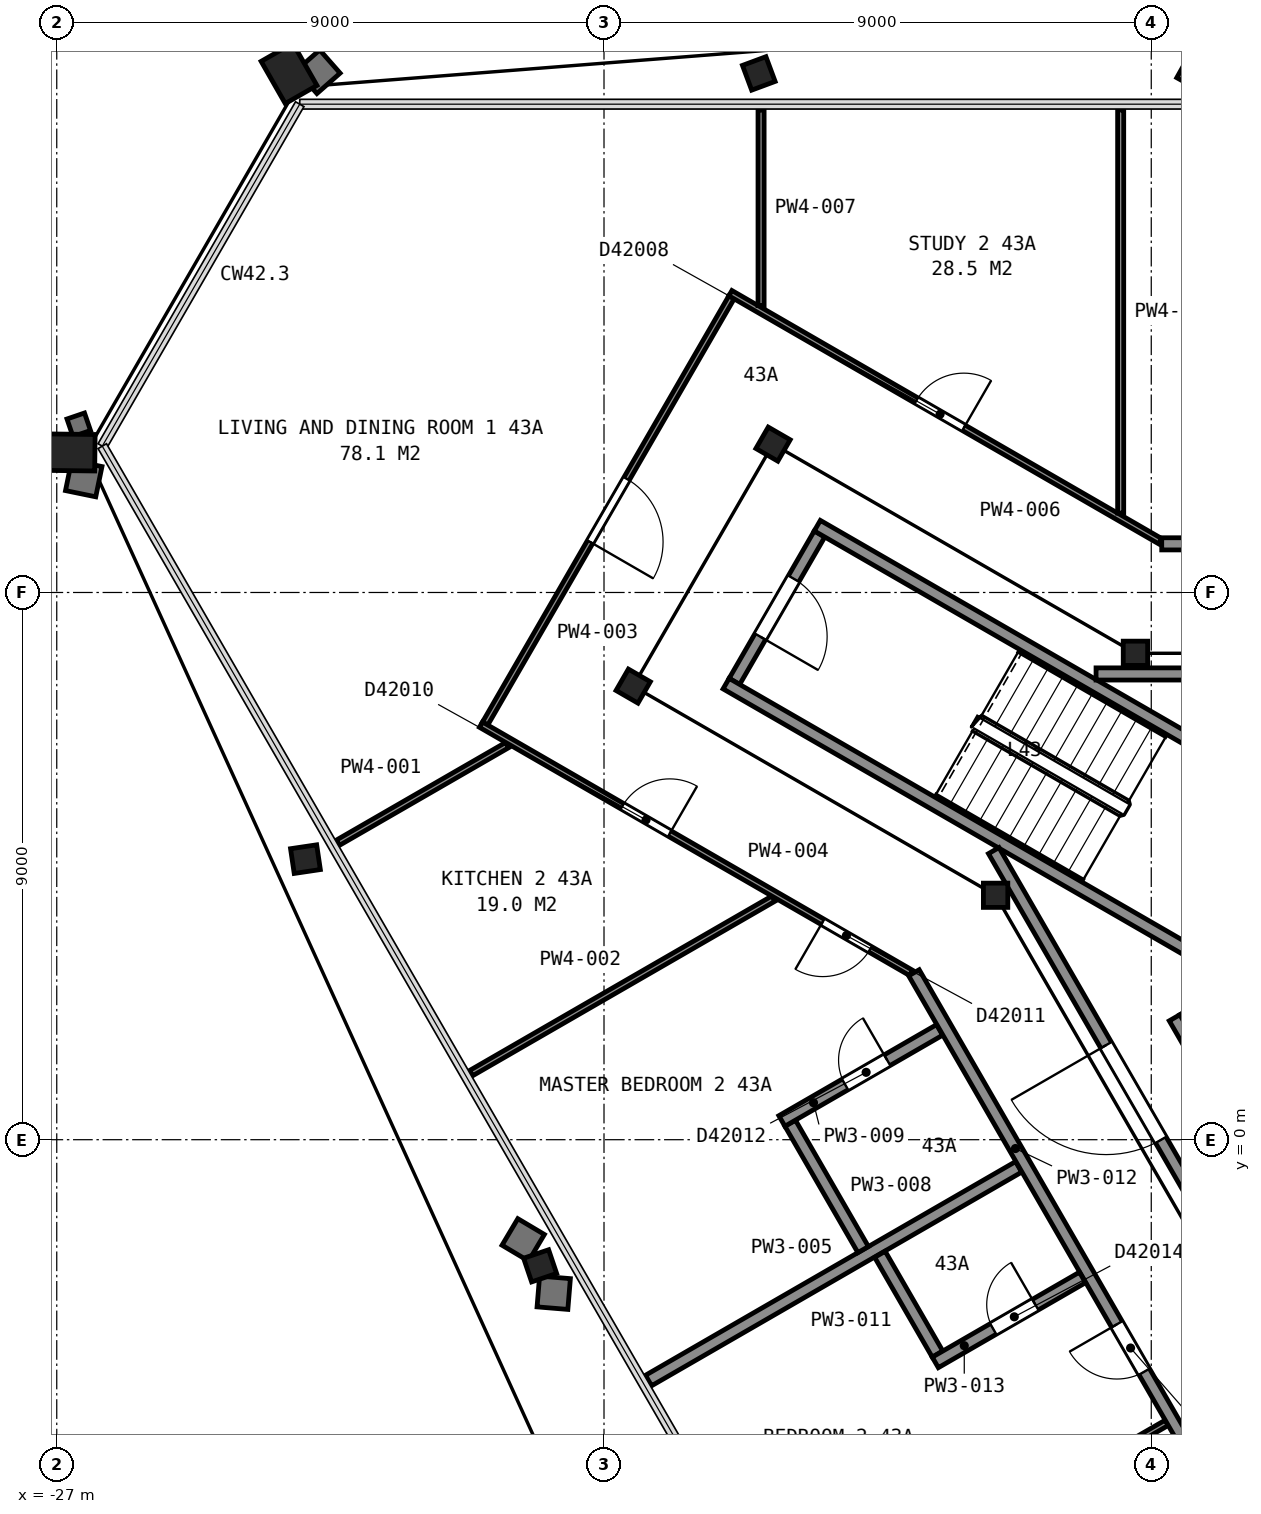
"""IFC4 building model, lengths in metres.
Left out: names, types, materials, properties, quantities, classifications, styles, units other than length and angle.
Written with IfcOpenShell. Run it as: python <this file> out.ifc"""

import sys

from ifc_helpers import new_model, si_unit, direction, frame, frame_2d, origin, origin_2d, place, context, subcontext, project, spatial, rectangle, hollow_rectangle, i_section, extrude, element, fill, save


model = new_model("IFC4")
c1 = context("Model", 3, precision=1e-05, world=origin(), true_north=direction((0.0, 1.0)))
c2 = subcontext(c1, "Body", "Model", "MODEL_VIEW")
j1 = project(units=[si_unit("LENGTHUNIT", "METRE"), si_unit("PLANEANGLEUNIT", "RADIAN")], contexts=[c1])
p1 = place(None, origin())
s1 = spatial("IfcSite", under=j1, at=p1, CompositionType="ELEMENT")
p2 = place(p1, origin())
s2 = spatial("IfcBuilding", under=s1, at=p2, CompositionType="ELEMENT")
p3 = place(p2, frame((0.0, 0.0, 174.7)))
s3 = spatial("IfcBuildingStorey", under=s2, at=p3, CompositionType="ELEMENT", Elevation=174.7)
p4 = place(p3, frame((-15.373, 17.318, 0.04), z_axis=(-0.06888386825, 0.185431142459, 0.980239921704), x_axis=(0.997540564772, 4.290776e-05, 0.070091510131)))
e1 = element("IfcColumn", 1, at=p4, inside=s3, PredefinedType="COLUMN", context=c2, shape_type="SweptSolid", body=[
    extrude(i_section(OverallWidth=0.411, OverallDepth=0.434, WebThickness=0.036, FlangeThickness=0.057, FilletRadius=0.015, at=origin_2d()), origin(), (0.0, 0.0, 1.0), 3.693),
])
p5 = place(p3, frame((-23.057, 17.322, 0.065), z_axis=(-0.105703911209, 0.184881619668, 0.977059604049), x_axis=(0.496815418669, 0.860963064013, -0.109165205894)))
e2 = element("IfcColumn", 2, at=p5, inside=s3, PredefinedType="COLUMN", context=c2, shape_type="SweptSolid", body=[
    extrude(hollow_rectangle(XDim=0.6, YDim=0.8, WallThickness=0.05, at=origin_2d()), origin(), (0.0, 0.0, 1.0), 3.654),
])
p6 = place(p3, frame((-26.524, 11.3, 0.065), z_axis=(-0.213901349947, 0.002605294393, 0.976851792716), x_axis=(0.49700817695, 0.861181491994, 0.106533139876)))
e3 = element("IfcColumn", 3, at=p6, inside=s3, PredefinedType="COLUMN", context=c2, shape_type="SweptSolid", body=[
    extrude(hollow_rectangle(XDim=0.6, YDim=0.8, WallThickness=0.05, at=origin_2d()), origin(), (0.0, 0.0, 1.0), 3.655),
])
p7 = place(p3, frame((-22.678, 4.649, 0.04), z_axis=(-0.196058591041, -0.029084888759, 0.980160751165), x_axis=(-0.498371232054, 0.863795030642, -0.07405579045)))
e4 = element("IfcColumn", 4, at=p7, inside=s3, PredefinedType="COLUMN", context=c2, shape_type="SweptSolid", body=[
    extrude(i_section(OverallWidth=0.411, OverallDepth=0.434, WebThickness=0.036, FlangeThickness=0.057, FilletRadius=0.015, at=origin_2d()), origin(), (0.0, 0.0, 1.0), 3.693),
])
p8 = place(p3, frame((-18.836, -2.002, 0.035), z_axis=(-0.180451873163, -0.061008975778, 0.981689882981), x_axis=(-0.499524497099, 0.86546437235, -0.038035470172)))
e5 = element("IfcColumn", 5, at=p8, inside=s3, PredefinedType="COLUMN", context=c2, shape_type="SweptSolid", body=[
    extrude(i_section(OverallWidth=0.411, OverallDepth=0.434, WebThickness=0.036, FlangeThickness=0.057, FilletRadius=0.015, at=origin_2d()), origin(), (0.0, 0.0, 1.0), 3.698),
])
p9 = place(p3, frame((-9.26, 8.0, 0.0), z_axis=(0.0, 0.0, 1.0), x_axis=(1.0, 0.0, 0.0)))
e6 = element("IfcColumn", 6, at=p9, inside=s3, PredefinedType="COLUMN", context=c2, shape_type="SweptSolid", body=[
    extrude(i_section(OverallWidth=0.401, OverallDepth=0.399, WebThickness=0.025, FlangeThickness=0.04, FilletRadius=0.015, at=origin_2d()), origin(), (0.0, 0.0, 1.0), 3.7),
])
for number, where, z_axis, x_axis in (
    (7, (-15.22, 11.44, 0.0), (0.0, 0.0, 1.0), (0.5, 0.866, 0.0)),
    (8, (-17.52, 7.46, 0.0), (0.0, 0.0, 1.0), (0.5, 0.866, 0.0)),
):
    element("IfcColumn", number, at=place(p3, frame(where, z_axis=z_axis, x_axis=x_axis)), inside=s3, PredefinedType="COLUMN", context=c2, shape_type="SweptSolid", body=[
        extrude(i_section(OverallWidth=0.406, OverallDepth=0.417, WebThickness=0.03, FlangeThickness=0.048, FilletRadius=0.015, at=origin_2d()), origin(), (0.0, 0.0, 1.0), 3.7),
    ])
p10 = place(p3, frame((-11.56, 4.02, 0.0), z_axis=(0.0, 0.0, 1.0), x_axis=(1.0, 0.0, 0.0)))
e9 = element("IfcColumn", 9, at=p10, inside=s3, PredefinedType="COLUMN", context=c2, shape_type="SweptSolid", body=[
    extrude(i_section(OverallWidth=0.401, OverallDepth=0.399, WebThickness=0.025, FlangeThickness=0.04, FilletRadius=0.015, at=origin_2d()), origin(), (0.0, 0.0, 1.0), 3.7),
])
p11 = place(p3, frame((-14.455, 9.962, 0.0), z_axis=(0.0, 0.0, 1.0), x_axis=(-0.500049511043, -0.865996816683, 0.0)))
e10 = element("IfcWall", 10, at=p11, inside=s3, PredefinedType="PARTITIONING", context=c2, shape_type="SweptSolid", body=[
    extrude(rectangle(XDim=2.8, YDim=0.2, at=frame_2d((1.4, 0.0))), origin(), (0.0, 0.0, 1.0), 3.45),
])
p12 = place(p11, frame((0.85, 0.0, 0.0)))
e11 = element("IfcOpeningElement", 11, at=p12, cuts=e10, PredefinedType="OPENING", context=c2, shape_type="SweptSolid", body=[
    extrude(rectangle(XDim=1.1, YDim=2.1, at=frame_2d((0.55, 1.05))), frame((0.0, 0.11, 0.0), z_axis=(0.0, -1.0, 0.0), x_axis=(1.0, 0.0, 0.0)), (0.0, 0.0, 1.0), 0.22),
])
for number, where, z_axis, x_axis in (
    (12, (-7.678, 2.701, 0.0), (0.0, 0.0, 1.0), (-0.866, 0.5, 0.0)),
    (13, (-6.178, 5.299, 0.0), (0.0, 0.0, 1.0), (-0.866, 0.5, 0.0)),
):
    element("IfcWall", number, at=place(p3, frame(where, z_axis=z_axis, x_axis=x_axis)), inside=s3, PredefinedType="PARTITIONING", context=c2, shape_type="SweptSolid", body=[
        extrude(rectangle(XDim=9.6, YDim=0.2, at=frame_2d((4.8, 0.0))), origin(), (0.0, 0.0, 1.0), 3.45),
    ])
p13 = place(p3, frame((-8.48, 1.969, 0.0), z_axis=(0.0, 0.0, 1.0), x_axis=(0.866000020948, 0.500043961785, 0.0)))
e14 = element("IfcWall", 14, at=p13, inside=s3, PredefinedType="PARTITIONING", context=c2, shape_type="SweptSolid", body=[
    extrude(rectangle(XDim=1.95, YDim=0.2, at=frame_2d((0.975, 0.0))), origin(), (0.0, 0.0, 1.0), 3.7),
])
p14 = place(p3, frame((-7.242, -0.376, 0.0), z_axis=(0.0, 0.0, 1.0), x_axis=(-0.499996545922, 0.866027397988, 0.0)))
e15 = element("IfcWall", 15, at=p14, inside=s3, PredefinedType="PARTITIONING", context=c2, shape_type="SweptSolid", body=[
    extrude(rectangle(XDim=2.75, YDim=0.2, at=frame_2d((1.375, 0.0))), origin(), (0.0, 0.0, 1.0), 3.7),
])
p15 = place(p3, frame((-11.591, 4.755, 0.0), z_axis=(0.0, 0.0, 1.0), x_axis=(0.500043977787, -0.866000011708, 0.0)))
e16 = element("IfcWall", 16, at=p15, inside=s3, PredefinedType="PARTITIONING", context=c2, shape_type="SweptSolid", body=[
    extrude(rectangle(XDim=6.617, YDim=0.2, at=frame_2d((3.308, 0.0))), origin(), (0.0, 0.0, 1.0), 3.45),
])
p16 = place(p15, frame((3.695, 0.0, 0.0)))
e17 = element("IfcOpeningElement", 17, at=p16, cuts=e16, PredefinedType="OPENING", context=c2, shape_type="SweptSolid", body=[
    extrude(rectangle(XDim=1.8, YDim=2.1, at=frame_2d((0.9, 1.05))), frame((0.0, 0.11, 0.0), z_axis=(0.0, -1.0, 0.0), x_axis=(1.0, 0.0, 0.0)), (0.0, 0.0, 1.0), 0.22),
])
p17 = place(p3, frame((-9.908, 7.66, 0.0), z_axis=(0.0, 0.0, 1.0), x_axis=(1.0, 0.0, 0.0)))
e18 = element("IfcWall", 18, at=p17, inside=s3, PredefinedType="PARTITIONING", context=c2, shape_type="SweptSolid", body=[
    extrude(rectangle(XDim=3.621, YDim=0.2, at=frame_2d((1.811, 0.0))), origin(), (0.0, 0.0, 1.0), 3.45),
])
p18 = place(p3, frame((-22.375, 4.885, 0.0), z_axis=(0.0, 0.0, 1.0), x_axis=(0.866164079783, 0.499759729163, 0.0)))
e19 = element("IfcWall", 19, at=p18, inside=s3, PredefinedType="PARTITIONING", context=c2, shape_type="SweptSolid", body=[
    extrude(rectangle(XDim=3.213, YDim=0.1, at=frame_2d((1.606, 0.0))), origin(), (0.0, 0.0, 1.0), 2.713),
])
p19 = place(p3, frame((-20.187, 1.094, 0.0), z_axis=(0.0, 0.0, 1.0), x_axis=(0.866060256018, 0.499939629302, 0.0)))
e20 = element("IfcWall", 20, at=p19, inside=s3, PredefinedType="PARTITIONING", context=c2, shape_type="SweptSolid", body=[
    extrude(rectangle(XDim=5.741, YDim=0.1, at=frame_2d((2.871, 0.0))), origin(), (0.0, 0.0, 1.0), 2.713),
])
p20 = place(p3, frame((-19.955, 6.844, 0.0), z_axis=(0.0, 0.0, 1.0), x_axis=(0.500415732313, 0.865785247537, 0.0)))
e21 = element("IfcWall", 21, at=p20, inside=s3, PredefinedType="PARTITIONING", context=c2, shape_type="SweptSolid", body=[
    extrude(rectangle(XDim=8.097, YDim=0.1, at=frame_2d((4.049, 0.0))), origin(), (0.0, 0.0, 1.0), 2.713),
])
p21 = place(p20, frame((3.45, 0.0, 0.0)))
e22 = element("IfcOpeningElement", 22, at=p21, cuts=e21, PredefinedType="OPENING", context=c2, shape_type="SweptSolid", body=[
    extrude(rectangle(XDim=1.2, YDim=2.1, at=frame_2d((0.6, 1.05))), frame((0.0, 0.06, 0.0), z_axis=(0.0, -1.0, 0.0), x_axis=(1.0, 0.0, 0.0)), (0.0, 0.0, 1.0), 0.12),
])
p22 = place(p3, frame((-12.952, 2.744, 0.0), z_axis=(0.0, 0.0, 1.0), x_axis=(-0.86608949446, 0.499888975259, 0.0)))
e23 = element("IfcWall", 23, at=p22, inside=s3, PredefinedType="PARTITIONING", context=c2, shape_type="SweptSolid", body=[
    extrude(rectangle(XDim=8.165, YDim=0.1, at=frame_2d((4.083, 0.0))), origin(), (0.0, 0.0, 1.0), 2.713),
])
p23 = place(p22, frame((4.581, 0.0, 0.0)))
e24 = element("IfcOpeningElement", 24, at=p23, cuts=e23, PredefinedType="OPENING", context=c2, shape_type="SweptSolid", body=[
    extrude(rectangle(XDim=0.9, YDim=2.1, at=frame_2d((0.45, 1.05))), frame((0.0, 0.06, 0.0), z_axis=(0.0, -1.0, 0.0), x_axis=(1.0, 0.0, 0.0)), (0.0, 0.0, 1.0), 0.12),
])
p24 = place(p22, frame((0.776, 0.0, 0.0)))
e25 = element("IfcOpeningElement", 25, at=p24, cuts=e23, PredefinedType="OPENING", context=c2, shape_type="SweptSolid", body=[
    extrude(rectangle(XDim=0.9, YDim=2.1, at=frame_2d((0.45, 1.05))), frame((0.0, 0.06, 0.0), z_axis=(0.0, -1.0, 0.0), x_axis=(1.0, 0.0, 0.0)), (0.0, 0.0, 1.0), 0.12),
])
p25 = place(p3, frame((-17.268, -3.961, 0.0), z_axis=(0.0, 0.0, 1.0), x_axis=(0.866002795668, 0.500039156363, 0.0)))
e26 = element("IfcWall", 26, at=p25, inside=s3, PredefinedType="PARTITIONING", context=c2, shape_type="SweptSolid", body=[
    extrude(rectangle(XDim=7.029, YDim=0.2, at=frame_2d((3.514, 0.0))), origin(), (0.0, 0.0, 1.0), 2.713),
])
p26 = place(p3, frame((-15.921, 13.923, 0.0), z_axis=(0.0, 0.0, 1.0), x_axis=(0.866088973199, -0.499889878377, 0.0)))
e27 = element("IfcWall", 27, at=p26, inside=s3, PredefinedType="PARTITIONING", context=c2, shape_type="SweptSolid", body=[
    extrude(rectangle(XDim=8.163, YDim=0.1, at=frame_2d((4.082, 0.0))), origin(), (0.0, 0.0, 1.0), 2.713),
])
p27 = place(p26, frame((3.532, 0.0, 0.0)))
e28 = element("IfcOpeningElement", 28, at=p27, cuts=e27, PredefinedType="OPENING", context=c2, shape_type="SweptSolid", body=[
    extrude(rectangle(XDim=0.9, YDim=2.1, at=frame_2d((0.45, 1.05))), frame((0.0, 0.06, 0.0), z_axis=(0.0, -1.0, 0.0), x_axis=(1.0, 0.0, 0.0)), (0.0, 0.0, 1.0), 0.12),
])
p28 = place(p3, frame((-15.417, 13.719, 0.0), z_axis=(0.0, 0.0, 1.0), x_axis=(0.0, 1.0, 0.0)))
e29 = element("IfcWall", 29, at=p28, inside=s3, PredefinedType="PARTITIONING", context=c2, shape_type="SweptSolid", body=[
    extrude(rectangle(XDim=3.217, YDim=0.1, at=frame_2d((1.608, 0.0))), origin(), (0.0, 0.0, 1.0), 2.713),
])
p29 = place(p3, frame((-14.938, 0.271, 0.0), z_axis=(0.0, 0.0, 1.0), x_axis=(0.499913221443, -0.866075499611, 0.0)))
e30 = element("IfcWall", 30, at=p29, inside=s3, PredefinedType="PARTITIONING", context=c2, shape_type="SweptSolid", body=[
    extrude(rectangle(XDim=2.4, YDim=0.2, at=frame_2d((1.2, 0.0))), origin(), (0.0, 0.0, 1.0), 2.713),
])
p30 = place(p3, frame((-12.481, 1.805, 0.0), z_axis=(0.0, 0.0, 1.0), x_axis=(-0.866052556263, -0.499952967579, 0.0)))
e31 = element("IfcWall", 31, at=p30, inside=s3, PredefinedType="PARTITIONING", context=c2, shape_type="SweptSolid", body=[
    extrude(rectangle(XDim=2.995, YDim=0.2, at=frame_2d((1.498, 0.0))), origin(), (0.0, 0.0, 1.0), 2.713),
])
p31 = place(p30, frame((0.995, 0.0, 0.0)))
e32 = element("IfcOpeningElement", 32, at=p31, cuts=e31, PredefinedType="OPENING", context=c2, shape_type="SweptSolid", body=[
    extrude(rectangle(XDim=0.8, YDim=2.1, at=frame_2d((0.4, 1.05))), frame((0.0, 0.11, 0.0), z_axis=(0.0, -1.0, 0.0), x_axis=(1.0, 0.0, 0.0)), (0.0, 0.0, 1.0), 0.22),
])
p32 = place(p3, frame((-14.836, -8.173, 0.0), z_axis=(0.0, 0.0, 1.0), x_axis=(0.866006381746, 0.500032945689, 0.0)))
e33 = element("IfcWall", 33, at=p32, inside=s3, PredefinedType="PARTITIONING", context=c2, shape_type="SweptSolid", body=[
    extrude(rectangle(XDim=7.033, YDim=0.1, at=frame_2d((3.517, 0.0))), origin(), (0.0, 0.0, 1.0), 2.713),
])
p33 = place(p3, frame((-13.462, -1.885, 0.0), z_axis=(0.0, 0.0, 1.0), x_axis=(0.499949193323, -0.866054735046, 0.0)))
e34 = element("IfcWall", 34, at=p33, inside=s3, PredefinedType="PARTITIONING", context=c2, shape_type="SweptSolid", body=[
    extrude(rectangle(XDim=1.895, YDim=0.2, at=frame_2d((0.948, 0.0))), origin(), (0.0, 0.0, 1.0), 2.713),
])
p34 = place(p3, frame((-4.075, -12.545, 0.0), z_axis=(0.0, 0.0, 1.0), x_axis=(-0.499999743747, 0.866025551732, 0.0)))
e35 = element("IfcWall", 35, at=p34, inside=s3, PredefinedType="PARTITIONING", context=c2, shape_type="SweptSolid", body=[
    extrude(rectangle(XDim=17.656, YDim=0.2, at=frame_2d((8.828, 0.0))), origin(), (0.0, 0.0, 1.0), 2.713),
])
p35 = place(p34, frame((10.08, 0.0, 0.0)))
e36 = element("IfcOpeningElement", 36, at=p35, cuts=e35, PredefinedType="OPENING", context=c2, shape_type="SweptSolid", body=[
    extrude(rectangle(XDim=0.9, YDim=2.1, at=frame_2d((0.45, 1.05))), frame((0.0, 0.11, 0.0), z_axis=(0.0, -1.0, 0.0), x_axis=(1.0, 0.0, 0.0)), (0.0, 0.0, 1.0), 0.22),
])
p36 = place(p34, frame((6.068, 0.0, 0.0)))
e37 = element("IfcOpeningElement", 37, at=p36, cuts=e35, PredefinedType="OPENING", context=c2, shape_type="SweptSolid", body=[
    extrude(rectangle(XDim=0.9, YDim=2.1, at=frame_2d((0.45, 1.05))), frame((0.0, 0.11, 0.0), z_axis=(0.0, -1.0, 0.0), x_axis=(1.0, 0.0, 0.0)), (0.0, 0.0, 1.0), 0.22),
])
p37 = place(p3, frame((-12.552, -3.663, 0.0), z_axis=(0.0, 0.0, 1.0), x_axis=(0.866003766563, 0.500037474894, 0.0)))
e38 = element("IfcWall", 38, at=p37, inside=s3, PredefinedType="PARTITIONING", context=c2, shape_type="SweptSolid", body=[
    extrude(rectangle(XDim=2.795, YDim=0.2, at=frame_2d((1.397, 0.0))), origin(), (0.0, 0.0, 1.0), 2.713),
])
p38 = place(p37, frame((1.1, 0.0, 0.0)))
e39 = element("IfcOpeningElement", 39, at=p38, cuts=e38, PredefinedType="OPENING", context=c2, shape_type="SweptSolid", body=[
    extrude(rectangle(XDim=0.8, YDim=2.1, at=frame_2d((0.4, 1.05))), frame((0.0, 0.11, 0.0), z_axis=(0.0, -1.0, 0.0), x_axis=(1.0, 0.0, 0.0)), (0.0, 0.0, 1.0), 0.22),
])
p39 = place(p3, frame((-9.503, 10.306, 0.0), z_axis=(0.0, 0.0, 1.0), x_axis=(0.0, 1.0, 0.0)))
e40 = element("IfcWall", 40, at=p39, inside=s3, PredefinedType="PARTITIONING", context=c2, shape_type="SweptSolid", body=[
    extrude(rectangle(XDim=6.629, YDim=0.1, at=frame_2d((3.315, 0.0))), origin(), (0.0, 0.0, 1.0), 2.713),
])
p40 = place(p3, frame((-8.828, 9.8, 0.0), z_axis=(0.0, 0.0, 1.0), x_axis=(1.0, 0.0, 0.0)))
e41 = element("IfcWall", 41, at=p40, inside=s3, PredefinedType="PARTITIONING", context=c2, shape_type="SweptSolid", body=[
    extrude(rectangle(XDim=17.656, YDim=0.2, at=frame_2d((8.828, 0.0))), origin(), (0.0, 0.0, 1.0), 2.713),
])
p41 = place(p40, frame((14.864, 0.0, 0.0)))
e42 = element("IfcOpeningElement", 42, at=p41, cuts=e41, PredefinedType="OPENING", context=c2, shape_type="SweptSolid", body=[
    extrude(rectangle(XDim=0.9, YDim=2.1, at=frame_2d((0.45, 1.05))), frame((0.0, 0.11, 0.0), z_axis=(0.0, -1.0, 0.0), x_axis=(1.0, 0.0, 0.0)), (0.0, 0.0, 1.0), 0.22),
])
p42 = place(p40, frame((6.488, 0.0, 0.0)))
e43 = element("IfcOpeningElement", 43, at=p42, cuts=e41, PredefinedType="OPENING", context=c2, shape_type="SweptSolid", body=[
    extrude(rectangle(XDim=0.9, YDim=2.1, at=frame_2d((0.45, 1.05))), frame((0.0, 0.11, 0.0), z_axis=(0.0, -1.0, 0.0), x_axis=(1.0, 0.0, 0.0)), (0.0, 0.0, 1.0), 0.22),
])
p43 = place(p40, frame((2.2, 0.0, 0.0)))
e44 = element("IfcOpeningElement", 44, at=p43, cuts=e41, PredefinedType="OPENING", context=c2, shape_type="SweptSolid", body=[
    extrude(rectangle(XDim=0.9, YDim=2.1, at=frame_2d((0.45, 1.05))), frame((0.0, 0.11, 0.0), z_axis=(0.0, -1.0, 0.0), x_axis=(1.0, 0.0, 0.0)), (0.0, 0.0, 1.0), 0.22),
])
p44 = place(p12, origin())
e45 = element("IfcDoor", 45, at=p44, inside=s3, OperationType="SINGLE_SWING_RIGHT", PredefinedType="DOOR", context=c2, shape_type="SweptSolid", body=[
    extrude(rectangle(XDim=1.1, YDim=2.1, at=frame_2d((0.55, 1.05))), frame((0.0, 0.025, 0.0), z_axis=(0.0, -1.0, 0.0), x_axis=(1.0, 0.0, 0.0)), (0.0, 0.0, 1.0), 0.05),
])
fill(e11, e45)
p45 = place(p16, origin())
e46 = element("IfcDoor", 46, at=p45, inside=s3, OperationType="DOUBLE_DOOR_SINGLE_SWING", PredefinedType="DOOR", context=c2, shape_type="SweptSolid", body=[
    extrude(rectangle(XDim=1.8, YDim=2.1, at=frame_2d((0.9, 1.05))), frame((0.0, 0.025, 0.0), z_axis=(0.0, -1.0, 0.0), x_axis=(1.0, 0.0, 0.0)), (0.0, 0.0, 1.0), 0.05),
])
fill(e17, e46)
p46 = place(p21, origin())
e47 = element("IfcDoor", 47, at=p46, inside=s3, OperationType="SINGLE_SWING_LEFT", PredefinedType="DOOR", context=c2, shape_type="SweptSolid", body=[
    extrude(rectangle(XDim=1.2, YDim=2.1, at=frame_2d((0.6, 1.05))), frame((0.0, 0.025, 0.0), z_axis=(0.0, -1.0, 0.0), x_axis=(1.0, 0.0, 0.0)), (0.0, 0.0, 1.0), 0.05),
])
fill(e22, e47)
p47 = place(p23, origin())
e48 = element("IfcDoor", 48, at=p47, inside=s3, OperationType="SINGLE_SWING_LEFT", PredefinedType="DOOR", context=c2, shape_type="SweptSolid", body=[
    extrude(rectangle(XDim=0.9, YDim=2.1, at=frame_2d((0.45, 1.05))), frame((0.0, 0.025, 0.0), z_axis=(0.0, -1.0, 0.0), x_axis=(1.0, 0.0, 0.0)), (0.0, 0.0, 1.0), 0.05),
])
fill(e24, e48)
p48 = place(p24, origin())
e49 = element("IfcDoor", 49, at=p48, inside=s3, OperationType="SINGLE_SWING_RIGHT", PredefinedType="DOOR", context=c2, shape_type="SweptSolid", body=[
    extrude(rectangle(XDim=0.9, YDim=2.1, at=frame_2d((0.45, 1.05))), frame((0.0, 0.025, 0.0), z_axis=(0.0, -1.0, 0.0), x_axis=(1.0, 0.0, 0.0)), (0.0, 0.0, 1.0), 0.05),
])
fill(e25, e49)
p49 = place(p27, origin())
e50 = element("IfcDoor", 50, at=p49, inside=s3, OperationType="SINGLE_SWING_RIGHT", PredefinedType="DOOR", context=c2, shape_type="SweptSolid", body=[
    extrude(rectangle(XDim=0.9, YDim=2.1, at=frame_2d((0.45, 1.05))), frame((0.0, 0.025, 0.0), z_axis=(0.0, -1.0, 0.0), x_axis=(1.0, 0.0, 0.0)), (0.0, 0.0, 1.0), 0.05),
])
fill(e28, e50)
p50 = place(p31, origin())
e51 = element("IfcDoor", 51, at=p50, inside=s3, OperationType="SINGLE_SWING_LEFT", PredefinedType="DOOR", context=c2, shape_type="SweptSolid", body=[
    extrude(rectangle(XDim=0.8, YDim=2.1, at=frame_2d((0.4, 1.05))), frame((0.0, 0.025, 0.0), z_axis=(0.0, -1.0, 0.0), x_axis=(1.0, 0.0, 0.0)), (0.0, 0.0, 1.0), 0.05),
])
fill(e32, e51)
p51 = place(p35, origin())
e52 = element("IfcDoor", 52, at=p51, inside=s3, OperationType="SINGLE_SWING_RIGHT", PredefinedType="DOOR", context=c2, shape_type="SweptSolid", body=[
    extrude(rectangle(XDim=0.9, YDim=2.1, at=frame_2d((0.45, 1.05))), frame((0.0, 0.025, 0.0), z_axis=(0.0, -1.0, 0.0), x_axis=(1.0, 0.0, 0.0)), (0.0, 0.0, 1.0), 0.05),
])
fill(e36, e52)
p52 = place(p38, origin())
e53 = element("IfcDoor", 53, at=p52, inside=s3, OperationType="SINGLE_SWING_RIGHT", PredefinedType="DOOR", context=c2, shape_type="SweptSolid", body=[
    extrude(rectangle(XDim=0.8, YDim=2.1, at=frame_2d((0.4, 1.05))), frame((0.0, 0.025, 0.0), z_axis=(0.0, -1.0, 0.0), x_axis=(1.0, 0.0, 0.0)), (0.0, 0.0, 1.0), 0.05),
])
fill(e39, e53)
save(model, sys.argv[1])
